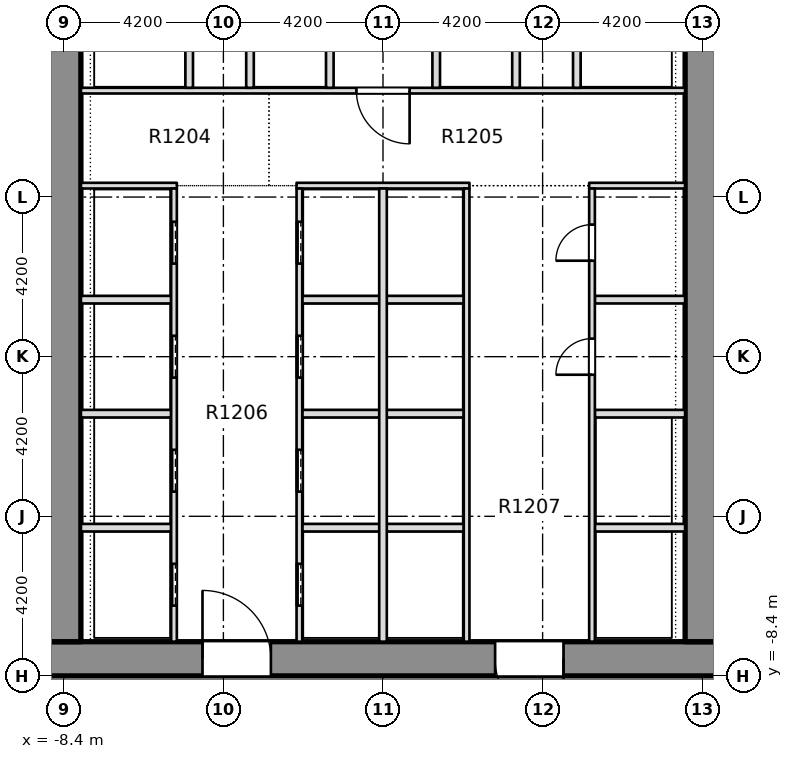
"""IFC4 building model, lengths in metres.
Left out: names, types, materials, properties, quantities, classifications, styles, units other than length and angle.
Written with IfcOpenShell. Run it as: python <this file> out.ifc"""

import sys

from ifc_helpers import new_model, si_unit, direction, frame, frame_2d, origin, place, context, subcontext, project, spatial, rectangle, extrude, element, fill, save


model = new_model("IFC4")
c1 = context("Model", 3, precision=1e-05, world=origin(), true_north=direction((0.0, 1.0)))
c2 = subcontext(c1, "Body", "Model", "MODEL_VIEW")
j1 = project(units=[si_unit("LENGTHUNIT", "METRE"), si_unit("PLANEANGLEUNIT", "RADIAN")], contexts=[c1])
p1 = place(None, origin())
s1 = spatial("IfcSite", under=j1, at=p1, CompositionType="ELEMENT")
p2 = place(p1, origin())
s2 = spatial("IfcBuilding", under=s1, at=p2, CompositionType="ELEMENT")
p3 = place(p2, frame((0.0, 0.0, 55.2)))
s3 = spatial("IfcBuildingStorey", under=s2, at=p3, CompositionType="ELEMENT", Elevation=55.2)
p4 = place(p3, frame((-11.7, -7.95, -0.32), z_axis=(0.0, 0.0, 1.0), x_axis=(1.0, 0.0, 0.0)))
e1 = element("IfcWall", 1, at=p4, inside=s3, PredefinedType="SHEAR", context=c2, shape_type="SweptSolid", body=[
    extrude(rectangle(XDim=23.4, YDim=0.9, at=frame_2d((11.7, 0.0))), origin(), (0.0, 0.0, 1.0), 3.45),
])
p5 = place(p4, frame((6.95, 0.0, 0.32)))
e2 = element("IfcOpeningElement", 2, at=p5, cuts=e1, PredefinedType="OPENING", context=c2, shape_type="SweptSolid", body=[
    extrude(rectangle(XDim=1.8, YDim=2.1, at=frame_2d((0.9, 1.05))), frame((0.0, 0.46, 0.0), z_axis=(0.0, -1.0, 0.0), x_axis=(1.0, 0.0, 0.0)), (0.0, 0.0, 1.0), 0.92),
])
p6 = place(p4, frame((14.65, 0.0, 0.32)))
e3 = element("IfcOpeningElement", 3, at=p6, cuts=e1, PredefinedType="OPENING", context=c2, shape_type="SweptSolid", body=[
    extrude(rectangle(XDim=1.8, YDim=2.1, at=frame_2d((0.9, 1.05))), frame((0.0, 0.46, 0.0), z_axis=(0.0, -1.0, 0.0), x_axis=(1.0, 0.0, 0.0)), (0.0, 0.0, 1.0), 0.92),
])
p7 = place(p3, frame((-8.4, -7.5, -0.32), z_axis=(0.0, 0.0, 1.0), x_axis=(0.0, 1.0, 0.0)))
e4 = element("IfcWall", 4, at=p7, inside=s3, PredefinedType="SHEAR", context=c2, shape_type="SweptSolid", body=[
    extrude(rectangle(XDim=28.35, YDim=0.9, at=frame_2d((14.175, 0.0))), origin(), (0.0, 0.0, 1.0), 3.45),
])
p8 = place(p7, frame((18.4, 0.0, 0.32)))
e5 = element("IfcOpeningElement", 5, at=p8, cuts=e4, PredefinedType="OPENING", context=c2, shape_type="SweptSolid", body=[
    extrude(rectangle(XDim=1.2, YDim=2.1, at=frame_2d((0.6, 1.05))), frame((0.0, 0.46, 0.0), z_axis=(0.0, -1.0, 0.0), x_axis=(1.0, 0.0, 0.0)), (0.0, 0.0, 1.0), 0.92),
])
p9 = place(p3, frame((8.4, -7.5, -0.32), z_axis=(0.0, 0.0, 1.0), x_axis=(0.0, 1.0, 0.0)))
e6 = element("IfcWall", 6, at=p9, inside=s3, PredefinedType="SHEAR", context=c2, shape_type="SweptSolid", body=[
    extrude(rectangle(XDim=28.35, YDim=0.9, at=frame_2d((14.175, 0.0))), origin(), (0.0, 0.0, 1.0), 3.45),
])
p10 = place(p9, frame((18.4, 0.0, 0.32)))
e7 = element("IfcOpeningElement", 7, at=p10, cuts=e6, PredefinedType="OPENING", context=c2, shape_type="SweptSolid", body=[
    extrude(rectangle(XDim=1.2, YDim=2.1, at=frame_2d((0.6, 1.05))), frame((0.0, 0.46, 0.0), z_axis=(0.0, -1.0, 0.0), x_axis=(1.0, 0.0, 0.0)), (0.0, 0.0, 1.0), 0.92),
])
p11 = place(p3, frame((-7.949, -4.5, 0.0), z_axis=(0.0, 0.0, 1.0), x_axis=(1.0, 0.0, 0.0)))
e8 = element("IfcWall", 8, at=p11, inside=s3, PredefinedType="PARTITIONING", context=c2, shape_type="SweptSolid", body=[
    extrude(rectangle(XDim=2.374, YDim=0.2, at=frame_2d((1.187, 0.0))), origin(), (0.0, 0.0, 1.0), 3.13),
])
p12 = place(p3, frame((-2.125, -4.5, 0.0), z_axis=(0.0, 0.0, 1.0), x_axis=(1.0, 0.0, 0.0)))
e9 = element("IfcWall", 9, at=p12, inside=s3, PredefinedType="PARTITIONING", context=c2, shape_type="SweptSolid", body=[
    extrude(rectangle(XDim=4.25, YDim=0.2, at=frame_2d((2.125, 0.0))), origin(), (0.0, 0.0, 1.0), 3.13),
])
for number, where, z_axis, x_axis in (
    (10, (5.575, -4.5, 0.0), (0.0, 0.0, 1.0), (1.0, 0.0, 0.0)),
    (11, (-7.949, -1.5, 0.0), (0.0, 0.0, 1.0), (1.0, 0.0, 0.0)),
):
    element("IfcWall", number, at=place(p3, frame(where, z_axis=z_axis, x_axis=x_axis)), inside=s3, PredefinedType="PARTITIONING", context=c2, shape_type="SweptSolid", body=[
        extrude(rectangle(XDim=2.374, YDim=0.2, at=frame_2d((1.187, 0.0))), origin(), (0.0, 0.0, 1.0), 3.13),
    ])
p13 = place(p3, frame((-2.125, -1.5, 0.0), z_axis=(0.0, 0.0, 1.0), x_axis=(1.0, 0.0, 0.0)))
e12 = element("IfcWall", 12, at=p13, inside=s3, PredefinedType="PARTITIONING", context=c2, shape_type="SweptSolid", body=[
    extrude(rectangle(XDim=4.25, YDim=0.2, at=frame_2d((2.125, 0.0))), origin(), (0.0, 0.0, 1.0), 3.13),
])
for number, where, z_axis, x_axis in (
    (13, (5.575, -1.5, 0.0), (0.0, 0.0, 1.0), (1.0, 0.0, 0.0)),
    (14, (-7.949, 1.5, 0.0), (0.0, 0.0, 1.0), (1.0, 0.0, 0.0)),
):
    element("IfcWall", number, at=place(p3, frame(where, z_axis=z_axis, x_axis=x_axis)), inside=s3, PredefinedType="PARTITIONING", context=c2, shape_type="SweptSolid", body=[
        extrude(rectangle(XDim=2.374, YDim=0.2, at=frame_2d((1.187, 0.0))), origin(), (0.0, 0.0, 1.0), 3.13),
    ])
p14 = place(p3, frame((-2.125, 1.5, 0.0), z_axis=(0.0, 0.0, 1.0), x_axis=(1.0, 0.0, 0.0)))
e15 = element("IfcWall", 15, at=p14, inside=s3, PredefinedType="PARTITIONING", context=c2, shape_type="SweptSolid", body=[
    extrude(rectangle(XDim=4.25, YDim=0.2, at=frame_2d((2.125, 0.0))), origin(), (0.0, 0.0, 1.0), 3.13),
])
p15 = place(p3, frame((5.575, 1.5, 0.0), z_axis=(0.0, 0.0, 1.0), x_axis=(1.0, 0.0, 0.0)))
e16 = element("IfcWall", 16, at=p15, inside=s3, PredefinedType="PARTITIONING", context=c2, shape_type="SweptSolid", body=[
    extrude(rectangle(XDim=2.374, YDim=0.2, at=frame_2d((1.187, 0.0))), origin(), (0.0, 0.0, 1.0), 3.13),
])
p16 = place(p3, frame((-7.949, 4.5, 0.0), z_axis=(0.0, 0.0, 1.0), x_axis=(1.0, 0.0, 0.0)))
e17 = element("IfcWall", 17, at=p16, inside=s3, PredefinedType="PARTITIONING", context=c2, shape_type="SweptSolid", body=[
    extrude(rectangle(XDim=2.524, YDim=0.15, at=frame_2d((1.262, 0.0))), origin(), (0.0, 0.0, 1.0), 3.13),
])
p17 = place(p3, frame((-2.275, 4.5, 0.0), z_axis=(0.0, 0.0, 1.0), x_axis=(1.0, 0.0, 0.0)))
e18 = element("IfcWall", 18, at=p17, inside=s3, PredefinedType="PARTITIONING", context=c2, shape_type="SweptSolid", body=[
    extrude(rectangle(XDim=4.55, YDim=0.15, at=frame_2d((2.275, 0.0))), origin(), (0.0, 0.0, 1.0), 3.13),
])
p18 = place(p3, frame((5.425, 4.5, 0.0), z_axis=(0.0, 0.0, 1.0), x_axis=(1.0, 0.0, 0.0)))
e19 = element("IfcWall", 19, at=p18, inside=s3, PredefinedType="PARTITIONING", context=c2, shape_type="SweptSolid", body=[
    extrude(rectangle(XDim=2.524, YDim=0.15, at=frame_2d((1.262, 0.0))), origin(), (0.0, 0.0, 1.0), 3.13),
])
p19 = place(p3, frame((-7.949, 7.0, 0.0), z_axis=(0.0, 0.0, 1.0), x_axis=(1.0, 0.0, 0.0)))
e20 = element("IfcWall", 20, at=p19, inside=s3, PredefinedType="PARTITIONING", context=c2, shape_type="SweptSolid", body=[
    extrude(rectangle(XDim=15.898, YDim=0.15, at=frame_2d((7.949, 0.0))), origin(), (0.0, 0.0, 1.0), 3.13),
])
p20 = place(p19, frame((7.249, 0.0, 0.0)))
e21 = element("IfcOpeningElement", 21, at=p20, cuts=e20, PredefinedType="OPENING", context=c2, shape_type="SweptSolid", body=[
    extrude(rectangle(XDim=1.4, YDim=2.1, at=frame_2d((0.7, 1.05))), frame((0.0, 0.085, 0.0), z_axis=(0.0, -1.0, 0.0), x_axis=(1.0, 0.0, 0.0)), (0.0, 0.0, 1.0), 0.17),
])
p21 = place(p3, frame((-5.5, -7.499, 0.0), z_axis=(0.0, 0.0, 1.0), x_axis=(0.0, 1.0, 0.0)))
e22 = element("IfcWall", 22, at=p21, inside=s3, PredefinedType="PARTITIONING", context=c2, shape_type="SweptSolid", body=[
    extrude(rectangle(XDim=11.924, YDim=0.15, at=frame_2d((5.962, 0.0))), origin(), (0.0, 0.0, 1.0), 3.13),
])
p22 = place(p21, frame((0.949, 0.0, 0.0)))
e23 = element("IfcOpeningElement", 23, at=p22, cuts=e22, PredefinedType="OPENING", context=c2, shape_type="SweptSolid", body=[
    extrude(rectangle(XDim=1.1, YDim=2.1, at=frame_2d((0.55, 1.05))), frame((0.0, 0.085, 0.0), z_axis=(0.0, -1.0, 0.0), x_axis=(1.0, 0.0, 0.0)), (0.0, 0.0, 1.0), 0.17),
])
p23 = place(p21, frame((3.949, 0.0, 0.0)))
e24 = element("IfcOpeningElement", 24, at=p23, cuts=e22, PredefinedType="OPENING", context=c2, shape_type="SweptSolid", body=[
    extrude(rectangle(XDim=1.1, YDim=2.1, at=frame_2d((0.55, 1.05))), frame((0.0, 0.085, 0.0), z_axis=(0.0, -1.0, 0.0), x_axis=(1.0, 0.0, 0.0)), (0.0, 0.0, 1.0), 0.17),
])
p24 = place(p21, frame((6.949, 0.0, 0.0)))
e25 = element("IfcOpeningElement", 25, at=p24, cuts=e22, PredefinedType="OPENING", context=c2, shape_type="SweptSolid", body=[
    extrude(rectangle(XDim=1.1, YDim=2.1, at=frame_2d((0.55, 1.05))), frame((0.0, 0.085, 0.0), z_axis=(0.0, -1.0, 0.0), x_axis=(1.0, 0.0, 0.0)), (0.0, 0.0, 1.0), 0.17),
])
p25 = place(p21, frame((9.949, 0.0, 0.0)))
e26 = element("IfcOpeningElement", 26, at=p25, cuts=e22, PredefinedType="OPENING", context=c2, shape_type="SweptSolid", body=[
    extrude(rectangle(XDim=1.1, YDim=2.1, at=frame_2d((0.55, 1.05))), frame((0.0, 0.085, 0.0), z_axis=(0.0, -1.0, 0.0), x_axis=(1.0, 0.0, 0.0)), (0.0, 0.0, 1.0), 0.17),
])
p26 = place(p3, frame((-5.1, 7.075, 0.0), z_axis=(0.0, 0.0, 1.0), x_axis=(0.0, 1.0, 0.0)))
e27 = element("IfcWall", 27, at=p26, inside=s3, PredefinedType="PARTITIONING", context=c2, shape_type="SweptSolid", body=[
    extrude(rectangle(XDim=2.725, YDim=0.2, at=frame_2d((1.363, 0.0))), origin(), (0.0, 0.0, 1.0), 3.13),
])
p27 = place(p3, frame((-3.5, 7.075, 0.0), z_axis=(0.0, 0.0, 1.0), x_axis=(0.0, 1.0, 0.0)))
e28 = element("IfcWall", 28, at=p27, inside=s3, PredefinedType="PARTITIONING", context=c2, shape_type="SweptSolid", body=[
    extrude(rectangle(XDim=2.85, YDim=0.2, at=frame_2d((1.425, 0.0))), origin(), (0.0, 0.0, 1.0), 3.13),
])
p28 = place(p3, frame((-2.2, -7.499, 0.0), z_axis=(0.0, 0.0, 1.0), x_axis=(0.0, 1.0, 0.0)))
e29 = element("IfcWall", 29, at=p28, inside=s3, PredefinedType="PARTITIONING", context=c2, shape_type="SweptSolid", body=[
    extrude(rectangle(XDim=11.924, YDim=0.15, at=frame_2d((5.962, 0.0))), origin(), (0.0, 0.0, 1.0), 3.13),
])
p29 = place(p28, frame((0.949, 0.0, 0.0)))
e30 = element("IfcOpeningElement", 30, at=p29, cuts=e29, PredefinedType="OPENING", context=c2, shape_type="SweptSolid", body=[
    extrude(rectangle(XDim=1.1, YDim=2.1, at=frame_2d((0.55, 1.05))), frame((0.0, 0.085, 0.0), z_axis=(0.0, -1.0, 0.0), x_axis=(1.0, 0.0, 0.0)), (0.0, 0.0, 1.0), 0.17),
])
p30 = place(p28, frame((3.949, 0.0, 0.0)))
e31 = element("IfcOpeningElement", 31, at=p30, cuts=e29, PredefinedType="OPENING", context=c2, shape_type="SweptSolid", body=[
    extrude(rectangle(XDim=1.1, YDim=2.1, at=frame_2d((0.55, 1.05))), frame((0.0, 0.085, 0.0), z_axis=(0.0, -1.0, 0.0), x_axis=(1.0, 0.0, 0.0)), (0.0, 0.0, 1.0), 0.17),
])
p31 = place(p28, frame((6.949, 0.0, 0.0)))
e32 = element("IfcOpeningElement", 32, at=p31, cuts=e29, PredefinedType="OPENING", context=c2, shape_type="SweptSolid", body=[
    extrude(rectangle(XDim=1.1, YDim=2.1, at=frame_2d((0.55, 1.05))), frame((0.0, 0.085, 0.0), z_axis=(0.0, -1.0, 0.0), x_axis=(1.0, 0.0, 0.0)), (0.0, 0.0, 1.0), 0.17),
])
p32 = place(p28, frame((9.949, 0.0, 0.0)))
e33 = element("IfcOpeningElement", 33, at=p32, cuts=e29, PredefinedType="OPENING", context=c2, shape_type="SweptSolid", body=[
    extrude(rectangle(XDim=1.1, YDim=2.1, at=frame_2d((0.55, 1.05))), frame((0.0, 0.085, 0.0), z_axis=(0.0, -1.0, 0.0), x_axis=(1.0, 0.0, 0.0)), (0.0, 0.0, 1.0), 0.17),
])
p33 = place(p3, frame((-1.4, 7.075, 0.0), z_axis=(0.0, 0.0, 1.0), x_axis=(0.0, 1.0, 0.0)))
e34 = element("IfcWall", 34, at=p33, inside=s3, PredefinedType="PARTITIONING", context=c2, shape_type="SweptSolid", body=[
    extrude(rectangle(XDim=2.85, YDim=0.2, at=frame_2d((1.425, 0.0))), origin(), (0.0, 0.0, 1.0), 3.13),
])
p34 = place(p3, frame((0.0, -7.499, 0.0), z_axis=(0.0, 0.0, 1.0), x_axis=(0.0, 1.0, 0.0)))
e35 = element("IfcWall", 35, at=p34, inside=s3, PredefinedType="PARTITIONING", context=c2, shape_type="SweptSolid", body=[
    extrude(rectangle(XDim=11.924, YDim=0.2, at=frame_2d((5.962, 0.0))), origin(), (0.0, 0.0, 1.0), 3.13),
])
p35 = place(p3, frame((1.4, 7.075, 0.0), z_axis=(0.0, 0.0, 1.0), x_axis=(0.0, 1.0, 0.0)))
e36 = element("IfcWall", 36, at=p35, inside=s3, PredefinedType="PARTITIONING", context=c2, shape_type="SweptSolid", body=[
    extrude(rectangle(XDim=2.85, YDim=0.2, at=frame_2d((1.425, 0.0))), origin(), (0.0, 0.0, 1.0), 3.13),
])
p36 = place(p3, frame((2.2, -7.499, 0.0), z_axis=(0.0, 0.0, 1.0), x_axis=(0.0, 1.0, 0.0)))
e37 = element("IfcWall", 37, at=p36, inside=s3, PredefinedType="PARTITIONING", context=c2, shape_type="SweptSolid", body=[
    extrude(rectangle(XDim=11.924, YDim=0.15, at=frame_2d((5.962, 0.0))), origin(), (0.0, 0.0, 1.0), 3.13),
])
p37 = place(p3, frame((3.5, 7.075, 0.0), z_axis=(0.0, 0.0, 1.0), x_axis=(0.0, 1.0, 0.0)))
e38 = element("IfcWall", 38, at=p37, inside=s3, PredefinedType="PARTITIONING", context=c2, shape_type="SweptSolid", body=[
    extrude(rectangle(XDim=2.85, YDim=0.2, at=frame_2d((1.425, 0.0))), origin(), (0.0, 0.0, 1.0), 3.13),
])
p38 = place(p3, frame((5.1, 7.075, 0.0), z_axis=(0.0, 0.0, 1.0), x_axis=(0.0, 1.0, 0.0)))
e39 = element("IfcWall", 39, at=p38, inside=s3, PredefinedType="PARTITIONING", context=c2, shape_type="SweptSolid", body=[
    extrude(rectangle(XDim=2.725, YDim=0.2, at=frame_2d((1.363, 0.0))), origin(), (0.0, 0.0, 1.0), 3.13),
])
p39 = place(p3, frame((5.5, -7.499, 0.0), z_axis=(0.0, 0.0, 1.0), x_axis=(0.0, 1.0, 0.0)))
e40 = element("IfcWall", 40, at=p39, inside=s3, PredefinedType="PARTITIONING", context=c2, shape_type="SweptSolid", body=[
    extrude(rectangle(XDim=11.924, YDim=0.15, at=frame_2d((5.962, 0.0))), origin(), (0.0, 0.0, 1.0), 3.13),
])
p40 = place(p39, frame((7.024, 0.0, 0.0)))
e41 = element("IfcOpeningElement", 41, at=p40, cuts=e40, PredefinedType="OPENING", context=c2, shape_type="SweptSolid", body=[
    extrude(rectangle(XDim=0.95, YDim=2.1, at=frame_2d((0.475, 1.05))), frame((0.0, 0.085, 0.0), z_axis=(0.0, -1.0, 0.0), x_axis=(1.0, 0.0, 0.0)), (0.0, 0.0, 1.0), 0.17),
])
p41 = place(p39, frame((10.024, 0.0, 0.0)))
e42 = element("IfcOpeningElement", 42, at=p41, cuts=e40, PredefinedType="OPENING", context=c2, shape_type="SweptSolid", body=[
    extrude(rectangle(XDim=0.95, YDim=2.1, at=frame_2d((0.475, 1.05))), frame((0.0, 0.085, 0.0), z_axis=(0.0, -1.0, 0.0), x_axis=(1.0, 0.0, 0.0)), (0.0, 0.0, 1.0), 0.17),
])
p42 = place(p22, origin())
e43 = element("IfcDoor", 43, at=p42, inside=s3, OperationType="SLIDING_TO_RIGHT", PredefinedType="DOOR", context=c2, shape_type="SweptSolid", body=[
    extrude(rectangle(XDim=1.1, YDim=2.1, at=frame_2d((0.55, 1.05))), frame((0.0, 0.025, 0.0), z_axis=(0.0, -1.0, 0.0), x_axis=(1.0, 0.0, 0.0)), (0.0, 0.0, 1.0), 0.05),
])
fill(e23, e43)
p43 = place(p23, origin())
e44 = element("IfcDoor", 44, at=p43, inside=s3, OperationType="SLIDING_TO_RIGHT", PredefinedType="DOOR", context=c2, shape_type="SweptSolid", body=[
    extrude(rectangle(XDim=1.1, YDim=2.1, at=frame_2d((0.55, 1.05))), frame((0.0, 0.025, 0.0), z_axis=(0.0, -1.0, 0.0), x_axis=(1.0, 0.0, 0.0)), (0.0, 0.0, 1.0), 0.05),
])
fill(e24, e44)
p44 = place(p24, origin())
e45 = element("IfcDoor", 45, at=p44, inside=s3, OperationType="SLIDING_TO_RIGHT", PredefinedType="DOOR", context=c2, shape_type="SweptSolid", body=[
    extrude(rectangle(XDim=1.1, YDim=2.1, at=frame_2d((0.55, 1.05))), frame((0.0, 0.025, 0.0), z_axis=(0.0, -1.0, 0.0), x_axis=(1.0, 0.0, 0.0)), (0.0, 0.0, 1.0), 0.05),
])
fill(e25, e45)
p45 = place(p25, origin())
e46 = element("IfcDoor", 46, at=p45, inside=s3, OperationType="SLIDING_TO_RIGHT", PredefinedType="DOOR", context=c2, shape_type="SweptSolid", body=[
    extrude(rectangle(XDim=1.1, YDim=2.1, at=frame_2d((0.55, 1.05))), frame((0.0, 0.025, 0.0), z_axis=(0.0, -1.0, 0.0), x_axis=(1.0, 0.0, 0.0)), (0.0, 0.0, 1.0), 0.05),
])
fill(e26, e46)
p46 = place(p29, origin())
e47 = element("IfcDoor", 47, at=p46, inside=s3, OperationType="SLIDING_TO_RIGHT", PredefinedType="DOOR", context=c2, shape_type="SweptSolid", body=[
    extrude(rectangle(XDim=1.1, YDim=2.1, at=frame_2d((0.55, 1.05))), frame((0.0, 0.025, 0.0), z_axis=(0.0, -1.0, 0.0), x_axis=(1.0, 0.0, 0.0)), (0.0, 0.0, 1.0), 0.05),
])
fill(e30, e47)
p47 = place(p30, origin())
e48 = element("IfcDoor", 48, at=p47, inside=s3, OperationType="SLIDING_TO_RIGHT", PredefinedType="DOOR", context=c2, shape_type="SweptSolid", body=[
    extrude(rectangle(XDim=1.1, YDim=2.1, at=frame_2d((0.55, 1.05))), frame((0.0, 0.025, 0.0), z_axis=(0.0, -1.0, 0.0), x_axis=(1.0, 0.0, 0.0)), (0.0, 0.0, 1.0), 0.05),
])
fill(e31, e48)
p48 = place(p31, origin())
e49 = element("IfcDoor", 49, at=p48, inside=s3, OperationType="SLIDING_TO_RIGHT", PredefinedType="DOOR", context=c2, shape_type="SweptSolid", body=[
    extrude(rectangle(XDim=1.1, YDim=2.1, at=frame_2d((0.55, 1.05))), frame((0.0, 0.025, 0.0), z_axis=(0.0, -1.0, 0.0), x_axis=(1.0, 0.0, 0.0)), (0.0, 0.0, 1.0), 0.05),
])
fill(e32, e49)
p49 = place(p32, origin())
e50 = element("IfcDoor", 50, at=p49, inside=s3, OperationType="SLIDING_TO_RIGHT", PredefinedType="DOOR", context=c2, shape_type="SweptSolid", body=[
    extrude(rectangle(XDim=1.1, YDim=2.1, at=frame_2d((0.55, 1.05))), frame((0.0, 0.025, 0.0), z_axis=(0.0, -1.0, 0.0), x_axis=(1.0, 0.0, 0.0)), (0.0, 0.0, 1.0), 0.05),
])
fill(e33, e50)
p50 = place(p40, origin())
e51 = element("IfcDoor", 51, at=p50, inside=s3, OperationType="SINGLE_SWING_RIGHT", PredefinedType="DOOR", context=c2, shape_type="SweptSolid", body=[
    extrude(rectangle(XDim=0.95, YDim=2.1, at=frame_2d((0.475, 1.05))), frame((0.0, 0.025, 0.0), z_axis=(0.0, -1.0, 0.0), x_axis=(1.0, 0.0, 0.0)), (0.0, 0.0, 1.0), 0.05),
])
fill(e41, e51)
p51 = place(p41, origin())
e52 = element("IfcDoor", 52, at=p51, inside=s3, OperationType="SINGLE_SWING_RIGHT", PredefinedType="DOOR", context=c2, shape_type="SweptSolid", body=[
    extrude(rectangle(XDim=0.95, YDim=2.1, at=frame_2d((0.475, 1.05))), frame((0.0, 0.025, 0.0), z_axis=(0.0, -1.0, 0.0), x_axis=(1.0, 0.0, 0.0)), (0.0, 0.0, 1.0), 0.05),
])
fill(e42, e52)
p52 = place(p20, origin())
e53 = element("IfcDoor", 53, at=p52, inside=s3, OperationType="SINGLE_SWING_RIGHT", PredefinedType="DOOR", context=c2, shape_type="SweptSolid", body=[
    extrude(rectangle(XDim=1.4, YDim=2.1, at=frame_2d((0.7, 1.05))), frame((0.0, 0.025, 0.0), z_axis=(0.0, -1.0, 0.0), x_axis=(1.0, 0.0, 0.0)), (0.0, 0.0, 1.0), 0.05),
])
fill(e21, e53)
p53 = place(p5, origin())
e54 = element("IfcDoor", 54, at=p53, inside=s3, OperationType="SINGLE_SWING_LEFT", PredefinedType="DOOR", context=c2, shape_type="SweptSolid", body=[
    extrude(rectangle(XDim=1.8, YDim=2.1, at=frame_2d((0.9, 1.05))), frame((0.0, 0.025, 0.0), z_axis=(0.0, -1.0, 0.0), x_axis=(1.0, 0.0, 0.0)), (0.0, 0.0, 1.0), 0.05),
])
fill(e2, e54)
p54 = place(p6, origin())
e55 = element("IfcDoor", 55, at=p54, inside=s3, OperationType="SINGLE_SWING_LEFT", PredefinedType="DOOR", context=c2, shape_type="SweptSolid", body=[
    extrude(rectangle(XDim=1.8, YDim=2.1, at=frame_2d((0.9, 1.05))), frame((0.0, 0.025, 0.0), z_axis=(0.0, -1.0, 0.0), x_axis=(1.0, 0.0, 0.0)), (0.0, 0.0, 1.0), 0.05),
])
fill(e3, e55)
save(model, sys.argv[1])
